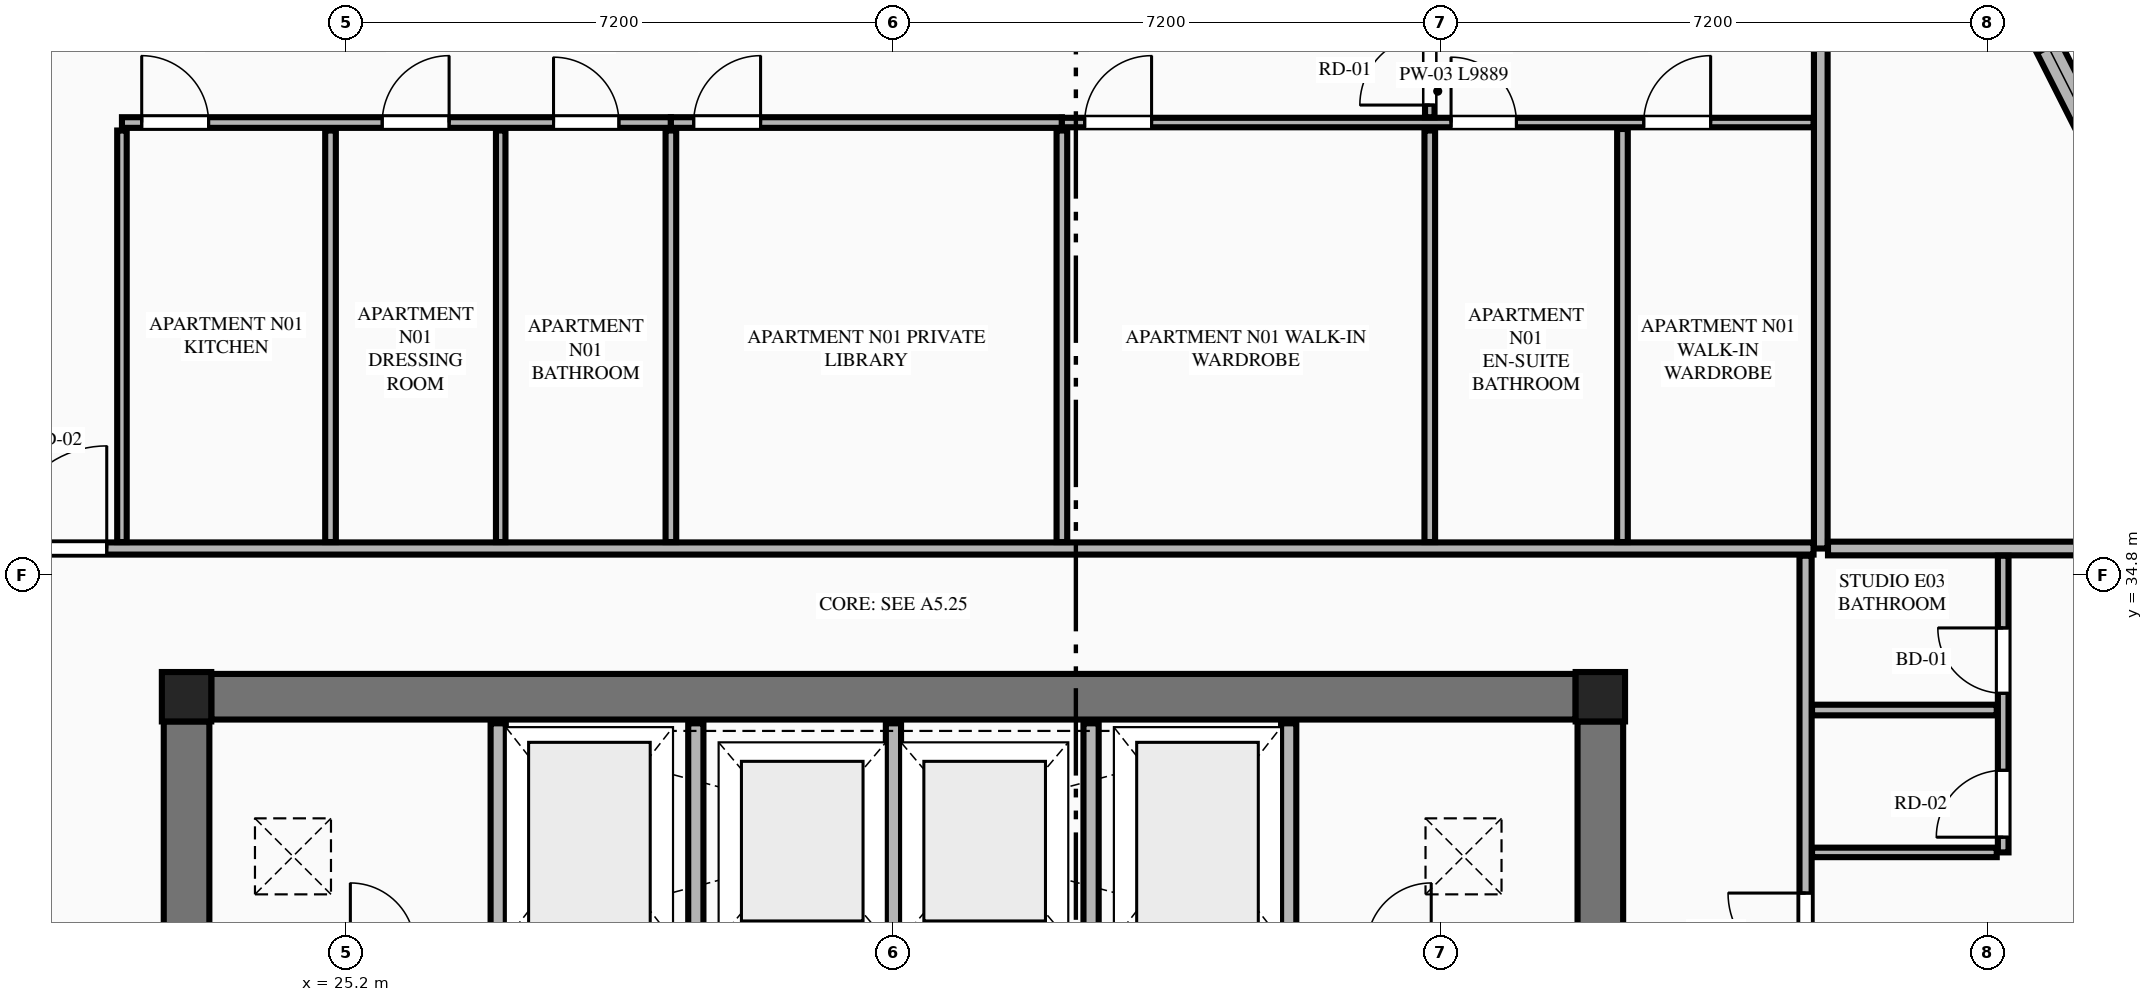
"""IFC4 building model, lengths in metres.
Left out: names, types, materials, properties, quantities, classifications, styles, units other than length and angle.
Written with IfcOpenShell. Run it as: python <this file> out.ifc"""

import sys

from ifc_helpers import new_model, si_unit, direction, frame, frame_2d, origin, origin_2d, place, context, subcontext, project, spatial, rectangle, extrude, element, fill, save


model = new_model("IFC4")
c1 = context("Model", 3, precision=1e-05, world=origin(), true_north=direction((0.0, 1.0)))
c2 = subcontext(c1, "Body", "Model", "MODEL_VIEW")
j1 = project(units=[si_unit("LENGTHUNIT", "METRE"), si_unit("PLANEANGLEUNIT", "RADIAN")], contexts=[c1])
p1 = place(None, origin())
s1 = spatial("IfcSite", under=j1, at=p1, CompositionType="ELEMENT")
p2 = place(p1, origin())
s2 = spatial("IfcBuilding", under=s1, at=p2, CompositionType="ELEMENT")
p3 = place(p2, frame((0.0, 0.0, 186.1)))
s3 = spatial("IfcBuildingStorey", under=s2, at=p3, CompositionType="ELEMENT", Elevation=186.1)
for number, where, z_axis, x_axis in (
    (1, (41.7, 33.2, 0.0), (0.0, 0.0, 1.0), (1.0, 0.0, 0.0)),
    (2, (23.1, 33.2, 0.0), (0.0, 0.0, 1.0), (1.0, 0.0, 0.0)),
):
    element("IfcColumn", number, at=place(p3, frame(where, z_axis=z_axis, x_axis=x_axis)), inside=s3, PredefinedType="COLUMN", context=c2, shape_type="SweptSolid", body=[
        extrude(rectangle(XDim=0.65, YDim=0.65, at=origin_2d()), origin(), (0.0, 0.0, 1.0), 3.55),
    ])
p4 = place(p3, frame((23.425, 33.2, 0.0), z_axis=(0.0, 0.0, 1.0), x_axis=(1.0, 0.0, 0.0)))
e3 = element("IfcWall", 3, at=p4, inside=s3, PredefinedType="SHEAR", context=c2, shape_type="SweptSolid", body=[
    extrude(rectangle(XDim=17.95, YDim=0.6, at=frame_2d((8.975, 0.0))), origin(), (0.0, 0.0, 1.0), 3.35),
])
p5 = place(p3, frame((23.1, 18.925, 0.0), z_axis=(0.0, 0.0, 1.0), x_axis=(0.0, 1.0, 0.0)))
e4 = element("IfcWall", 4, at=p5, inside=s3, PredefinedType="SHEAR", context=c2, shape_type="SweptSolid", body=[
    extrude(rectangle(XDim=13.95, YDim=0.6, at=frame_2d((6.975, 0.0))), origin(), (0.0, 0.0, 1.0), 3.35),
])
p6 = place(p5, frame((2.915, 0.0, 0.0)))
e5 = element("IfcOpeningElement", 5, at=p6, cuts=e4, PredefinedType="OPENING", context=c2, shape_type="SweptSolid", body=[
    extrude(rectangle(XDim=1.22, YDim=2.25, at=frame_2d((0.61, 1.125))), frame((0.0, 0.31, 0.0), z_axis=(0.0, -1.0, 0.0), x_axis=(1.0, 0.0, 0.0)), (0.0, 0.0, 1.0), 0.62),
])
p7 = place(p3, frame((41.7, 18.925, 0.0), z_axis=(0.0, 0.0, 1.0), x_axis=(0.0, 1.0, 0.0)))
e6 = element("IfcWall", 6, at=p7, inside=s3, PredefinedType="SHEAR", context=c2, shape_type="SweptSolid", body=[
    extrude(rectangle(XDim=13.95, YDim=0.6, at=frame_2d((6.975, 0.0))), origin(), (0.0, 0.0, 1.0), 3.35),
])
p8 = place(p7, frame((2.915, 0.0, 0.0)))
e7 = element("IfcOpeningElement", 7, at=p8, cuts=e6, PredefinedType="OPENING", context=c2, shape_type="SweptSolid", body=[
    extrude(rectangle(XDim=1.22, YDim=2.25, at=frame_2d((0.61, 1.125))), frame((0.0, 0.31, 0.0), z_axis=(0.0, -1.0, 0.0), x_axis=(1.0, 0.0, 0.0)), (0.0, 0.0, 1.0), 0.62),
])
for number, where, z_axis, x_axis in (
    (8, (27.2, 30.0, 0.0), (0.0, 0.0, 1.0), (0.0, 1.0, 0.0)),
    (9, (29.8, 30.0, 0.0), (0.0, 0.0, 1.0), (0.0, 1.0, 0.0)),
    (10, (32.4, 30.0, 0.0), (0.0, 0.0, 1.0), (0.0, 1.0, 0.0)),
    (11, (35.0, 30.0, 0.0), (0.0, 0.0, 1.0), (0.0, 1.0, 0.0)),
    (12, (37.6, 30.0, 0.0), (0.0, 0.0, 1.0), (0.0, 1.0, 0.0)),
):
    element("IfcWall", number, at=place(p3, frame(where, z_axis=z_axis, x_axis=x_axis)), inside=s3, PredefinedType="PLUMBINGWALL", context=c2, shape_type="SweptSolid", body=[
        extrude(rectangle(XDim=2.85, YDim=0.2, at=frame_2d((1.425, 0.0))), origin(), (0.0, 0.0, 1.0), 3.35),
    ])
p9 = place(p3, frame((48.919, 39.13, 0.0), z_axis=(0.0, 0.0, 1.0), x_axis=(-0.45150207307, 0.892270070109, 0.0)))
e13 = element("IfcWall", 13, at=p9, inside=s3, PredefinedType="STANDARD", context=c2, shape_type="SweptSolid", body=[
    extrude(rectangle(XDim=4.731, YDim=0.34, at=frame_2d((2.365, 0.0))), origin(), (0.0, 0.0, 1.0), 2.883),
])
p10 = place(p9, frame((1.815, 0.0, 0.75)))
e14 = element("IfcOpeningElement", 14, at=p10, cuts=e13, PredefinedType="OPENING", context=c2, shape_type="SweptSolid", body=[
    extrude(rectangle(XDim=1.1, YDim=1.983, at=frame_2d((0.55, 0.991))), frame((0.0, 0.18, 0.0), z_axis=(0.0, -1.0, 0.0), x_axis=(1.0, 0.0, 0.0)), (0.0, 0.0, 1.0), 0.36),
])
p11 = place(p3, frame((44.6, 35.15, 0.0), z_axis=(0.0, 0.0, 1.0), x_axis=(0.0, 1.0, 0.0)))
e15 = element("IfcWall", 15, at=p11, inside=s3, PredefinedType="PARTITIONING", context=c2, shape_type="SweptSolid", body=[
    extrude(rectangle(XDim=10.482, YDim=0.18, at=frame_2d((5.241, 0.0))), origin(), (0.0, 0.0, 1.0), 3.35),
])
p12 = place(p3, frame((20.295, 35.15, 0.0), z_axis=(0.0, 0.0, 1.0), x_axis=(1.0, 0.0, 0.0)))
e16 = element("IfcWall", 16, at=p12, inside=s3, PredefinedType="PARTITIONING", context=c2, shape_type="SweptSolid", body=[
    extrude(rectangle(XDim=24.21, YDim=0.16, at=frame_2d((12.105, 0.0))), origin(), (0.0, 0.0, 1.0), 3.35),
])
p13 = place(p12, frame((0.405, 0.0, 0.0)))
e17 = element("IfcOpeningElement", 17, at=p13, cuts=e16, PredefinedType="OPENING", context=c2, shape_type="SweptSolid", body=[
    extrude(rectangle(XDim=1.35, YDim=2.35, at=frame_2d((0.675, 1.175))), frame((0.0, 0.09, 0.0), z_axis=(0.0, -1.0, 0.0), x_axis=(1.0, 0.0, 0.0)), (0.0, 0.0, 1.0), 0.18),
])
p14 = place(p3, frame((22.25, 35.235, 0.0), z_axis=(0.0, 0.0, 1.0), x_axis=(0.0, 1.0, 0.0)))
e18 = element("IfcWall", 18, at=p14, inside=s3, PredefinedType="PARTITIONING", context=c2, shape_type="SweptSolid", body=[
    extrude(rectangle(XDim=5.414, YDim=0.125, at=frame_2d((2.707, 0.0))), origin(), (0.0, 0.0, 1.0), 2.807),
])
p15 = place(p3, frame((22.25, 40.754, 0.0), z_axis=(0.0, 0.0, 1.0), x_axis=(1.0, 0.0, 0.0)))
e19 = element("IfcWall", 19, at=p15, inside=s3, PredefinedType="PLUMBINGWALL", context=c2, shape_type="SweptSolid", body=[
    extrude(rectangle(XDim=7.222, YDim=0.14, at=frame_2d((3.611, 0.0))), origin(), (0.0, 0.0, 1.0), 3.35),
])
p16 = place(p15, frame((5.678, 0.0, 0.0)))
e20 = element("IfcOpeningElement", 20, at=p16, cuts=e19, PredefinedType="OPENING", context=c2, shape_type="SweptSolid", body=[
    extrude(rectangle(XDim=0.86, YDim=2.1, at=frame_2d((0.43, 1.05))), frame((0.0, 0.08, 0.0), z_axis=(0.0, -1.0, 0.0), x_axis=(1.0, 0.0, 0.0)), (0.0, 0.0, 1.0), 0.16),
])
p17 = place(p15, frame((0.26, 0.0, 0.0)))
e21 = element("IfcOpeningElement", 21, at=p17, cuts=e19, PredefinedType="OPENING", context=c2, shape_type="SweptSolid", body=[
    extrude(rectangle(XDim=0.88, YDim=2.15, at=frame_2d((0.44, 1.075))), frame((0.0, 0.08, 0.0), z_axis=(0.0, -1.0, 0.0), x_axis=(1.0, 0.0, 0.0)), (0.0, 0.0, 1.0), 0.16),
])
p18 = place(p15, frame((3.424, 0.0, 0.0)))
e22 = element("IfcOpeningElement", 22, at=p18, cuts=e19, PredefinedType="OPENING", context=c2, shape_type="SweptSolid", body=[
    extrude(rectangle(XDim=0.88, YDim=2.15, at=frame_2d((0.44, 1.075))), frame((0.0, 0.08, 0.0), z_axis=(0.0, -1.0, 0.0), x_axis=(1.0, 0.0, 0.0)), (0.0, 0.0, 1.0), 0.16),
])
p19 = place(p3, frame((29.472, 40.754, 0.0), z_axis=(0.0, 0.0, 1.0), x_axis=(1.0, 0.0, 0.0)))
e23 = element("IfcWall", 23, at=p19, inside=s3, PredefinedType="PLUMBINGWALL", context=c2, shape_type="SweptSolid", body=[
    extrude(rectangle(XDim=5.144, YDim=0.14, at=frame_2d((2.572, 0.0))), origin(), (0.0, 0.0, 1.0), 3.35),
])
p20 = place(p19, frame((0.3, 0.0, 0.0)))
e24 = element("IfcOpeningElement", 24, at=p20, cuts=e23, PredefinedType="OPENING", context=c2, shape_type="SweptSolid", body=[
    extrude(rectangle(XDim=0.88, YDim=2.15, at=frame_2d((0.44, 1.075))), frame((0.0, 0.08, 0.0), z_axis=(0.0, -1.0, 0.0), x_axis=(1.0, 0.0, 0.0)), (0.0, 0.0, 1.0), 0.16),
])
p21 = place(p3, frame((34.616, 40.754, 0.0), z_axis=(0.0, 0.0, 1.0), x_axis=(1.0, 0.0, 0.0)))
e25 = element("IfcWall", 25, at=p21, inside=s3, PredefinedType="PARTITIONING", context=c2, shape_type="SweptSolid", body=[
    extrude(rectangle(XDim=9.889, YDim=0.125, at=frame_2d((4.944, 0.0))), origin(), (0.0, 0.0, 1.0), 3.35),
])
p22 = place(p21, frame((5.12, 0.0, 0.0)))
e26 = element("IfcOpeningElement", 26, at=p22, cuts=e25, PredefinedType="OPENING", context=c2, shape_type="SweptSolid", body=[
    extrude(rectangle(XDim=0.86, YDim=2.1, at=frame_2d((0.43, 1.05))), frame((0.0, 0.073, 0.0), z_axis=(0.0, -1.0, 0.0), x_axis=(1.0, 0.0, 0.0)), (0.0, 0.0, 1.0), 0.145),
])
p23 = place(p21, frame((7.655, 0.0, 0.0)))
e27 = element("IfcOpeningElement", 27, at=p23, cuts=e25, PredefinedType="OPENING", context=c2, shape_type="SweptSolid", body=[
    extrude(rectangle(XDim=0.88, YDim=2.15, at=frame_2d((0.44, 1.075))), frame((0.0, 0.073, 0.0), z_axis=(0.0, -1.0, 0.0), x_axis=(1.0, 0.0, 0.0)), (0.0, 0.0, 1.0), 0.145),
])
p24 = place(p21, frame((0.3, 0.0, 0.0)))
e28 = element("IfcOpeningElement", 28, at=p24, cuts=e25, PredefinedType="OPENING", context=c2, shape_type="SweptSolid", body=[
    extrude(rectangle(XDim=0.88, YDim=2.15, at=frame_2d((0.44, 1.075))), frame((0.0, 0.073, 0.0), z_axis=(0.0, -1.0, 0.0), x_axis=(1.0, 0.0, 0.0)), (0.0, 0.0, 1.0), 0.145),
])
p25 = place(p3, frame((24.994, 35.235, 0.0), z_axis=(0.0, 0.0, 1.0), x_axis=(0.0, 1.0, 0.0)))
e29 = element("IfcWall", 29, at=p25, inside=s3, PredefinedType="PLUMBINGWALL", context=c2, shape_type="SweptSolid", body=[
    extrude(rectangle(XDim=5.414, YDim=0.14, at=frame_2d((2.707, 0.0))), origin(), (0.0, 0.0, 1.0), 3.35),
])
p26 = place(p3, frame((27.233, 35.235, 0.0), z_axis=(0.0, 0.0, 1.0), x_axis=(0.0, 1.0, 0.0)))
e30 = element("IfcWall", 30, at=p26, inside=s3, PredefinedType="PARTITIONING", context=c2, shape_type="SweptSolid", body=[
    extrude(rectangle(XDim=5.414, YDim=0.125, at=frame_2d((2.707, 0.0))), origin(), (0.0, 0.0, 1.0), 3.35),
])
p27 = place(p3, frame((39.456, 40.824, 0.0), z_axis=(0.0, 0.0, 1.0), x_axis=(0.0, 1.0, 0.0)))
e31 = element("IfcWall", 31, at=p27, inside=s3, PredefinedType="PARTITIONING", context=c2, shape_type="SweptSolid", body=[
    extrude(rectangle(XDim=1.33, YDim=0.125, at=frame_2d((0.665, 0.0))), origin(), (0.0, 0.0, 1.0), 3.35),
])
p28 = place(p27, frame((0.16, 0.0, 0.0)))
e32 = element("IfcOpeningElement", 32, at=p28, cuts=e31, PredefinedType="OPENING", context=c2, shape_type="SweptSolid", body=[
    extrude(rectangle(XDim=0.92, YDim=2.15, at=frame_2d((0.46, 1.075))), frame((0.0, 0.073, 0.0), z_axis=(0.0, -1.0, 0.0), x_axis=(1.0, 0.0, 0.0)), (0.0, 0.0, 1.0), 0.145),
])
for number, where, z_axis, x_axis in (
    (33, (29.472, 35.235, 0.0), (0.0, 0.0, 1.0), (0.0, 1.0, 0.0)),
    (34, (34.616, 35.235, 0.0), (0.0, 0.0, 1.0), (0.0, 1.0, 0.0)),
    (35, (39.456, 35.235, 0.0), (0.0, 0.0, 1.0), (0.0, 1.0, 0.0)),
):
    element("IfcWall", number, at=place(p3, frame(where, z_axis=z_axis, x_axis=x_axis)), inside=s3, PredefinedType="PLUMBINGWALL", context=c2, shape_type="SweptSolid", body=[
        extrude(rectangle(XDim=5.414, YDim=0.14, at=frame_2d((2.707, 0.0))), origin(), (0.0, 0.0, 1.0), 3.35),
    ])
p29 = place(p3, frame((41.991, 35.235, 0.0), z_axis=(0.0, 0.0, 1.0), x_axis=(0.0, 1.0, 0.0)))
e36 = element("IfcWall", 36, at=p29, inside=s3, PredefinedType="PLUMBINGWALL", context=c2, shape_type="SweptSolid", body=[
    extrude(rectangle(XDim=5.434, YDim=0.14, at=frame_2d((2.717, 0.0))), origin(), (0.0, 0.0, 1.0), 2.807),
])
p30 = place(p3, frame((44.695, 35.15, 0.0), z_axis=(0.0, 0.0, 1.0), x_axis=(1.0, 0.0, 0.0)))
e37 = element("IfcWall", 37, at=p30, inside=s3, PredefinedType="PARTITIONING", context=c2, shape_type="SweptSolid", body=[
    extrude(rectangle(XDim=5.995, YDim=0.18, at=frame_2d((2.998, 0.0))), origin(), (0.0, 0.0, 1.0), 3.35),
])
p31 = place(p3, frame((44.4, 29.197, 0.0), z_axis=(0.0, 0.0, 1.0), x_axis=(0.0, 1.0, 0.0)))
e38 = element("IfcWall", 38, at=p31, inside=s3, PredefinedType="PARTITIONING", context=c2, shape_type="SweptSolid", body=[
    extrude(rectangle(XDim=5.858, YDim=0.16, at=frame_2d((2.929, 0.0))), origin(), (0.0, 0.0, 1.0), 3.35),
])
p32 = place(p31, frame((0.4, 0.0, 0.0)))
e39 = element("IfcOpeningElement", 39, at=p32, cuts=e38, PredefinedType="OPENING", context=c2, shape_type="SweptSolid", body=[
    extrude(rectangle(XDim=1.02, YDim=2.25, at=frame_2d((0.51, 1.125))), frame((0.0, 0.09, 0.0), z_axis=(0.0, -1.0, 0.0), x_axis=(1.0, 0.0, 0.0)), (0.0, 0.0, 1.0), 0.18),
])
p33 = place(p3, frame((44.485, 31.152, 0.0), z_axis=(0.0, 0.0, 1.0), x_axis=(1.0, 0.0, 0.0)))
e40 = element("IfcWall", 40, at=p33, inside=s3, PredefinedType="PARTITIONING", context=c2, shape_type="SweptSolid", body=[
    extrude(rectangle(XDim=2.43, YDim=0.125, at=frame_2d((1.215, 0.0))), origin(), (0.0, 0.0, 1.0), 3.35),
])
p34 = place(p3, frame((47.0, 31.152, 0.0), z_axis=(0.0, 0.0, 1.0), x_axis=(0.0, 1.0, 0.0)))
e41 = element("IfcWall", 41, at=p34, inside=s3, PredefinedType="PLUMBINGWALL", context=c2, shape_type="SweptSolid", body=[
    extrude(rectangle(XDim=3.903, YDim=0.14, at=frame_2d((1.951, 0.0))), origin(), (0.0, 0.0, 1.0), 3.35),
])
p35 = place(p34, frame((2.093, 0.0, 0.0)))
e42 = element("IfcOpeningElement", 42, at=p35, cuts=e41, PredefinedType="OPENING", context=c2, shape_type="SweptSolid", body=[
    extrude(rectangle(XDim=0.86, YDim=2.1, at=frame_2d((0.43, 1.05))), frame((0.0, 0.08, 0.0), z_axis=(0.0, -1.0, 0.0), x_axis=(1.0, 0.0, 0.0)), (0.0, 0.0, 1.0), 0.16),
])
p36 = place(p34, frame((0.2, 0.0, 0.0)))
e43 = element("IfcOpeningElement", 43, at=p36, cuts=e41, PredefinedType="OPENING", context=c2, shape_type="SweptSolid", body=[
    extrude(rectangle(XDim=0.88, YDim=2.15, at=frame_2d((0.44, 1.075))), frame((0.0, 0.08, 0.0), z_axis=(0.0, -1.0, 0.0), x_axis=(1.0, 0.0, 0.0)), (0.0, 0.0, 1.0), 0.16),
])
p37 = place(p3, frame((44.485, 33.025, 0.0), z_axis=(0.0, 0.0, 1.0), x_axis=(1.0, 0.0, 0.0)))
e44 = element("IfcWall", 44, at=p37, inside=s3, PredefinedType="PLUMBINGWALL", context=c2, shape_type="SweptSolid", body=[
    extrude(rectangle(XDim=2.43, YDim=0.14, at=frame_2d((1.215, 0.0))), origin(), (0.0, 0.0, 1.0), 3.35),
])
p38 = place(p10, origin())
e45 = element("IfcWindow", 45, at=p38, inside=s3, PartitioningType="SINGLE_PANEL", PredefinedType="WINDOW", context=c2, shape_type="SweptSolid", body=[
    extrude(rectangle(XDim=1.1, YDim=1.983, at=frame_2d((0.55, 0.991))), frame((0.0, 0.03, 0.0), z_axis=(0.0, -1.0, 0.0), x_axis=(1.0, 0.0, 0.0)), (0.0, 0.0, 1.0), 0.06),
])
fill(e14, e45)
p39 = place(p16, origin())
e46 = element("IfcDoor", 46, at=p39, inside=s3, OperationType="SINGLE_SWING_LEFT", PredefinedType="DOOR", context=c2, shape_type="SweptSolid", body=[
    extrude(rectangle(XDim=0.86, YDim=2.1, at=frame_2d((0.43, 1.05))), frame((0.0, 0.025, 0.0), z_axis=(0.0, -1.0, 0.0), x_axis=(1.0, 0.0, 0.0)), (0.0, 0.0, 1.0), 0.05),
])
fill(e20, e46)
p40 = place(p22, origin())
e47 = element("IfcDoor", 47, at=p40, inside=s3, OperationType="SINGLE_SWING_LEFT", PredefinedType="DOOR", context=c2, shape_type="SweptSolid", body=[
    extrude(rectangle(XDim=0.86, YDim=2.1, at=frame_2d((0.43, 1.05))), frame((0.0, 0.025, 0.0), z_axis=(0.0, -1.0, 0.0), x_axis=(1.0, 0.0, 0.0)), (0.0, 0.0, 1.0), 0.05),
])
fill(e26, e47)
p41 = place(p23, origin())
e48 = element("IfcDoor", 48, at=p41, inside=s3, OperationType="SINGLE_SWING_RIGHT", PredefinedType="DOOR", context=c2, shape_type="SweptSolid", body=[
    extrude(rectangle(XDim=0.88, YDim=2.15, at=frame_2d((0.44, 1.075))), frame((0.0, 0.025, 0.0), z_axis=(0.0, -1.0, 0.0), x_axis=(1.0, 0.0, 0.0)), (0.0, 0.0, 1.0), 0.05),
])
fill(e27, e48)
p42 = place(p13, origin())
e49 = element("IfcDoor", 49, at=p42, inside=s3, OperationType="SINGLE_SWING_RIGHT", PredefinedType="DOOR", context=c2, shape_type="SweptSolid", body=[
    extrude(rectangle(XDim=1.35, YDim=2.35, at=frame_2d((0.675, 1.175))), frame((0.0, 0.025, 0.0), z_axis=(0.0, -1.0, 0.0), x_axis=(1.0, 0.0, 0.0)), (0.0, 0.0, 1.0), 0.05),
])
fill(e17, e49)
p43 = place(p17, origin())
e50 = element("IfcDoor", 50, at=p43, inside=s3, OperationType="SINGLE_SWING_LEFT", PredefinedType="DOOR", context=c2, shape_type="SweptSolid", body=[
    extrude(rectangle(XDim=0.88, YDim=2.15, at=frame_2d((0.44, 1.075))), frame((0.0, 0.025, 0.0), z_axis=(0.0, -1.0, 0.0), x_axis=(1.0, 0.0, 0.0)), (0.0, 0.0, 1.0), 0.05),
])
fill(e21, e50)
p44 = place(p18, origin())
e51 = element("IfcDoor", 51, at=p44, inside=s3, OperationType="SINGLE_SWING_RIGHT", PredefinedType="DOOR", context=c2, shape_type="SweptSolid", body=[
    extrude(rectangle(XDim=0.88, YDim=2.15, at=frame_2d((0.44, 1.075))), frame((0.0, 0.025, 0.0), z_axis=(0.0, -1.0, 0.0), x_axis=(1.0, 0.0, 0.0)), (0.0, 0.0, 1.0), 0.05),
])
fill(e22, e51)
p45 = place(p20, origin())
e52 = element("IfcDoor", 52, at=p45, inside=s3, OperationType="SINGLE_SWING_RIGHT", PredefinedType="DOOR", context=c2, shape_type="SweptSolid", body=[
    extrude(rectangle(XDim=0.88, YDim=2.15, at=frame_2d((0.44, 1.075))), frame((0.0, 0.025, 0.0), z_axis=(0.0, -1.0, 0.0), x_axis=(1.0, 0.0, 0.0)), (0.0, 0.0, 1.0), 0.05),
])
fill(e24, e52)
p46 = place(p28, origin())
e53 = element("IfcDoor", 53, at=p46, inside=s3, OperationType="SINGLE_SWING_LEFT", PredefinedType="DOOR", context=c2, shape_type="SweptSolid", body=[
    extrude(rectangle(XDim=0.92, YDim=2.15, at=frame_2d((0.46, 1.075))), frame((0.0, 0.025, 0.0), z_axis=(0.0, -1.0, 0.0), x_axis=(1.0, 0.0, 0.0)), (0.0, 0.0, 1.0), 0.05),
])
fill(e32, e53)
p47 = place(p24, origin())
e54 = element("IfcDoor", 54, at=p47, inside=s3, OperationType="SINGLE_SWING_RIGHT", PredefinedType="DOOR", context=c2, shape_type="SweptSolid", body=[
    extrude(rectangle(XDim=0.88, YDim=2.15, at=frame_2d((0.44, 1.075))), frame((0.0, 0.025, 0.0), z_axis=(0.0, -1.0, 0.0), x_axis=(1.0, 0.0, 0.0)), (0.0, 0.0, 1.0), 0.05),
])
fill(e28, e54)
p48 = place(p35, origin())
e55 = element("IfcDoor", 55, at=p48, inside=s3, OperationType="SINGLE_SWING_RIGHT", PredefinedType="DOOR", context=c2, shape_type="SweptSolid", body=[
    extrude(rectangle(XDim=0.86, YDim=2.1, at=frame_2d((0.43, 1.05))), frame((0.0, 0.025, 0.0), z_axis=(0.0, -1.0, 0.0), x_axis=(1.0, 0.0, 0.0)), (0.0, 0.0, 1.0), 0.05),
])
fill(e42, e55)
p49 = place(p32, origin())
e56 = element("IfcDoor", 56, at=p49, inside=s3, OperationType="SINGLE_SWING_RIGHT", PredefinedType="DOOR", context=c2, shape_type="SweptSolid", body=[
    extrude(rectangle(XDim=1.02, YDim=2.25, at=frame_2d((0.51, 1.125))), frame((0.0, 0.025, 0.0), z_axis=(0.0, -1.0, 0.0), x_axis=(1.0, 0.0, 0.0)), (0.0, 0.0, 1.0), 0.05),
])
fill(e39, e56)
p50 = place(p36, origin())
e57 = element("IfcDoor", 57, at=p50, inside=s3, OperationType="SINGLE_SWING_LEFT", PredefinedType="DOOR", context=c2, shape_type="SweptSolid", body=[
    extrude(rectangle(XDim=0.88, YDim=2.15, at=frame_2d((0.44, 1.075))), frame((0.0, 0.025, 0.0), z_axis=(0.0, -1.0, 0.0), x_axis=(1.0, 0.0, 0.0)), (0.0, 0.0, 1.0), 0.05),
])
fill(e43, e57)
save(model, sys.argv[1])
